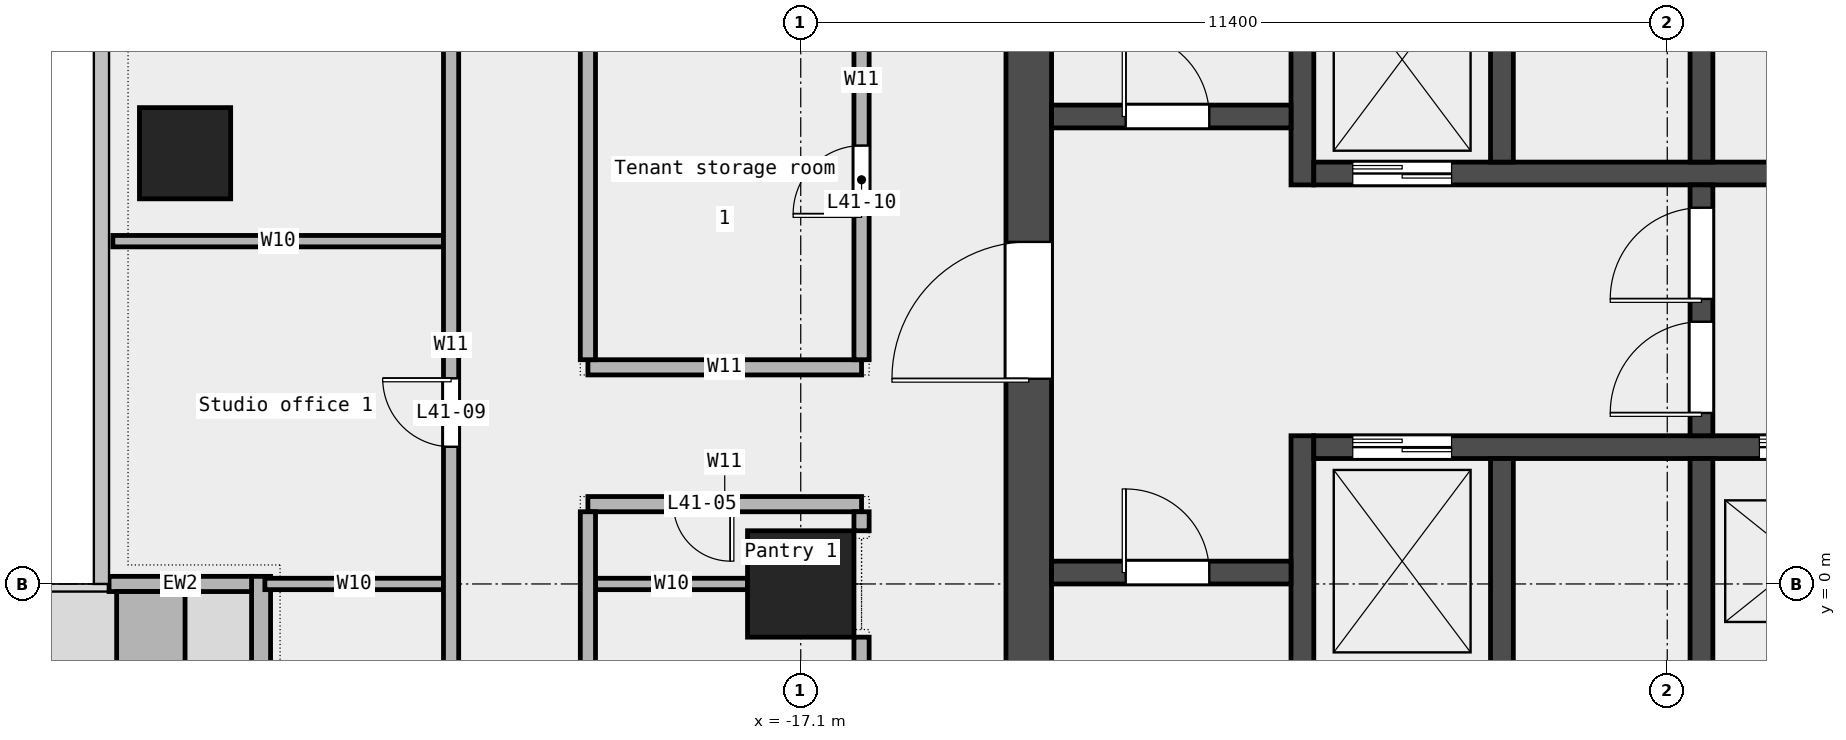
"""IFC4 building model, lengths in metres.
Left out: names, types, materials, properties, quantities, classifications, styles, units other than length and angle.
Written with IfcOpenShell. Run it as: python <this file> out.ifc"""

import sys

from ifc_helpers import new_model, si_unit, direction, frame, frame_2d, origin, origin_2d, place, context, subcontext, project, spatial, rectangle, extrude, element, fill, save


model = new_model("IFC4")
c1 = context("Model", 3, precision=1e-05, world=origin(), true_north=direction((0.0, 1.0)))
c2 = subcontext(c1, "Body", "Model", "MODEL_VIEW")
j1 = project(units=[si_unit("LENGTHUNIT", "METRE"), si_unit("PLANEANGLEUNIT", "RADIAN")], contexts=[c1])
p1 = place(None, origin())
s1 = spatial("IfcSite", under=j1, at=p1, CompositionType="ELEMENT")
p2 = place(p1, origin())
s2 = spatial("IfcBuilding", under=s1, at=p2, CompositionType="ELEMENT")
p3 = place(p2, frame((0.0, 0.0, 197.0)))
s3 = spatial("IfcBuildingStorey", under=s2, at=p3, CompositionType="ELEMENT", Elevation=197.0)
p4 = place(p3, frame((-25.2, 5.667, 0.0), z_axis=(0.0, 0.0, 1.0), x_axis=(1.0, 0.0, 0.0)))
e1 = element("IfcColumn", 1, at=p4, inside=s3, PredefinedType="COLUMN", context=c2, shape_type="SweptSolid", body=[
    extrude(rectangle(XDim=1.2, YDim=1.2, at=origin_2d()), origin(), (0.0, 0.0, 1.0), 3.6),
])
p5 = place(p3, frame((-17.1, 0.0, 0.0), z_axis=(0.0, 0.0, 1.0), x_axis=(1.0, 0.0, 0.0)))
e2 = element("IfcColumn", 2, at=p5, inside=s3, PredefinedType="COLUMN", context=c2, shape_type="SweptSolid", body=[
    extrude(rectangle(XDim=1.4, YDim=1.4, at=origin_2d()), origin(), (0.0, 0.0, 1.0), 3.6),
])
p6 = place(p3, frame((-24.2, 0.1, 0.0), z_axis=(0.0, 0.0, 1.0), x_axis=(0.0, -1.0, 0.0)))
e3 = element("IfcWall", 3, at=p6, inside=s3, PredefinedType="STANDARD", context=c2, shape_type="SweptSolid", body=[
    extrude(rectangle(XDim=12.95, YDim=0.25, at=frame_2d((6.475, 0.0))), origin(), (0.0, 0.0, 1.0), 3.6),
])
p7 = place(p6, frame((1.5, 0.0, 0.45)))
e4 = element("IfcOpeningElement", 4, at=p7, cuts=e3, PredefinedType="OPENING", context=c2, shape_type="SweptSolid", body=[
    extrude(rectangle(XDim=1.5, YDim=2.4, at=frame_2d((0.75, 1.2))), frame((0.0, 0.137, 0.0), z_axis=(0.0, -1.0, 0.0), x_axis=(1.0, 0.0, 0.0)), (0.0, 0.0, 1.0), 0.274),
])
p8 = place(p6, frame((6.75, 0.0, 0.0)))
e5 = element("IfcOpeningElement", 5, at=p8, cuts=e3, PredefinedType="OPENING", context=c2, shape_type="SweptSolid", body=[
    extrude(rectangle(XDim=1.8, YDim=2.4, at=frame_2d((0.9, 1.2))), frame((0.0, 0.137, 0.0), z_axis=(0.0, -1.0, 0.0), x_axis=(1.0, 0.0, 0.0)), (0.0, 0.0, 1.0), 0.274),
])
p9 = place(p6, frame((10.0, 0.0, 0.45)))
e6 = element("IfcOpeningElement", 6, at=p9, cuts=e3, PredefinedType="OPENING", context=c2, shape_type="SweptSolid", body=[
    extrude(rectangle(XDim=1.5, YDim=2.4, at=frame_2d((0.75, 1.2))), frame((0.0, 0.137, 0.0), z_axis=(0.0, -1.0, 0.0), x_axis=(1.0, 0.0, 0.0)), (0.0, 0.0, 1.0), 0.274),
])
p10 = place(p3, frame((-26.2, 0.0, 0.0), z_axis=(0.0, 0.0, 1.0), x_axis=(1.0, 0.0, 0.0)))
e7 = element("IfcWall", 7, at=p10, inside=s3, PredefinedType="STANDARD", context=c2, shape_type="SweptSolid", body=[
    extrude(rectangle(XDim=1.875, YDim=0.2, at=frame_2d((0.938, 0.0))), origin(), (0.0, 0.0, 1.0), 3.6),
])
p11 = place(p3, frame((-25.65, -0.1, 0.0), z_axis=(0.0, 0.0, 1.0), x_axis=(0.0, -1.0, 0.0)))
e8 = element("IfcWall", 8, at=p11, inside=s3, PredefinedType="STANDARD", context=c2, shape_type="SweptSolid", body=[
    extrude(rectangle(XDim=3.6, YDim=0.9, at=frame_2d((1.8, 0.0))), origin(), (0.0, 0.0, 1.0), 0.7),
])
p12 = place(p3, frame((-24.15, 0.0, 0.0), z_axis=(0.0, 0.0, 1.0), x_axis=(1.0, 0.0, 0.0)))
e9 = element("IfcWall", 9, at=p12, inside=s3, PredefinedType="PARTITIONING", context=c2, shape_type="SweptSolid", body=[
    extrude(rectangle(XDim=2.35, YDim=0.15, at=frame_2d((1.175, 0.0))), origin(), (0.0, 0.0, 1.0), 3.6),
])
p13 = place(p3, frame((-19.8, 0.0, 0.0), z_axis=(0.0, 0.0, 1.0), x_axis=(1.0, 0.0, 0.0)))
e10 = element("IfcWall", 10, at=p13, inside=s3, PredefinedType="PARTITIONING", context=c2, shape_type="SweptSolid", body=[
    extrude(rectangle(XDim=2.0, YDim=0.15, at=frame_2d((1.0, 0.0))), origin(), (0.0, 0.0, 1.0), 3.6),
])
p14 = place(p3, frame((-19.9, 1.05, 0.0), z_axis=(0.0, 0.0, 1.0), x_axis=(1.0, 0.0, 0.0)))
e11 = element("IfcWall", 11, at=p14, inside=s3, PredefinedType="PARTITIONING", context=c2, shape_type="SweptSolid", body=[
    extrude(rectangle(XDim=3.6, YDim=0.2, at=frame_2d((1.8, 0.0))), origin(), (0.0, 0.0, 1.0), 3.6),
])
p15 = place(p14, frame((1.125, 0.0, 0.0)))
e12 = element("IfcOpeningElement", 12, at=p15, cuts=e11, PredefinedType="OPENING", context=c2, shape_type="SweptSolid", body=[
    extrude(rectangle(XDim=0.75, YDim=2.1, at=frame_2d((0.375, 1.05))), frame((0.0, 0.112, 0.0), z_axis=(0.0, -1.0, 0.0), x_axis=(1.0, 0.0, 0.0)), (0.0, 0.0, 1.0), 0.224),
])
p16 = place(p3, frame((-19.9, 2.85, 0.0), z_axis=(0.0, 0.0, 1.0), x_axis=(1.0, 0.0, 0.0)))
e13 = element("IfcWall", 13, at=p16, inside=s3, PredefinedType="PARTITIONING", context=c2, shape_type="SweptSolid", body=[
    extrude(rectangle(XDim=3.6, YDim=0.2, at=frame_2d((1.8, 0.0))), origin(), (0.0, 0.0, 1.0), 3.6),
])
p17 = place(p3, frame((-26.15, 4.51, 0.0), z_axis=(0.0, 0.0, 1.0), x_axis=(1.0, 0.0, 0.0)))
e14 = element("IfcWall", 14, at=p17, inside=s3, PredefinedType="PARTITIONING", context=c2, shape_type="SweptSolid", body=[
    extrude(rectangle(XDim=4.35, YDim=0.15, at=frame_2d((2.175, 0.0))), origin(), (0.0, 0.0, 1.0), 3.6),
])
p18 = place(p3, frame((-21.7, -9.0, 0.0), z_axis=(0.0, 0.0, 1.0), x_axis=(0.0, 1.0, 0.0)))
e15 = element("IfcWall", 15, at=p18, inside=s3, PredefinedType="PARTITIONING", context=c2, shape_type="SweptSolid", body=[
    extrude(rectangle(XDim=24.3, YDim=0.2, at=frame_2d((12.15, 0.0))), origin(), (0.0, 0.0, 1.0), 3.6),
])
p19 = place(p18, frame((18.305, 0.0, 0.0)))
e16 = element("IfcOpeningElement", 16, at=p19, cuts=e15, PredefinedType="OPENING", context=c2, shape_type="SweptSolid", body=[
    extrude(rectangle(XDim=1.2, YDim=2.1, at=frame_2d((0.6, 1.05))), frame((0.0, 0.112, 0.0), z_axis=(0.0, -1.0, 0.0), x_axis=(1.0, 0.0, 0.0)), (0.0, 0.0, 1.0), 0.224),
])
p20 = place(p18, frame((10.805, 0.0, 0.0)))
e17 = element("IfcOpeningElement", 17, at=p20, cuts=e15, PredefinedType="OPENING", context=c2, shape_type="SweptSolid", body=[
    extrude(rectangle(XDim=0.9, YDim=2.1, at=frame_2d((0.45, 1.05))), frame((0.0, 0.112, 0.0), z_axis=(0.0, -1.0, 0.0), x_axis=(1.0, 0.0, 0.0)), (0.0, 0.0, 1.0), 0.224),
])
p21 = place(p3, frame((-19.9, -9.0, 0.0), z_axis=(0.0, 0.0, 1.0), x_axis=(0.0, 1.0, 0.0)))
e18 = element("IfcWall", 18, at=p21, inside=s3, PredefinedType="PARTITIONING", context=c2, shape_type="SweptSolid", body=[
    extrude(rectangle(XDim=9.95, YDim=0.2, at=frame_2d((4.975, 0.0))), origin(), (0.0, 0.0, 1.0), 3.6),
])
p22 = place(p3, frame((-19.9, 2.95, 0.0), z_axis=(0.0, 0.0, 1.0), x_axis=(0.0, 1.0, 0.0)))
e19 = element("IfcWall", 19, at=p22, inside=s3, PredefinedType="PARTITIONING", context=c2, shape_type="SweptSolid", body=[
    extrude(rectangle(XDim=12.35, YDim=0.2, at=frame_2d((6.175, 0.0))), origin(), (0.0, 0.0, 1.0), 3.6),
])
p23 = place(p3, frame((-16.3, -9.0, 0.0), z_axis=(0.0, 0.0, 1.0), x_axis=(0.0, 1.0, 0.0)))
e20 = element("IfcWall", 20, at=p23, inside=s3, PredefinedType="PARTITIONING", context=c2, shape_type="SweptSolid", body=[
    extrude(rectangle(XDim=8.3, YDim=0.2, at=frame_2d((4.15, 0.0))), origin(), (0.0, 0.0, 1.0), 3.6),
])
p24 = place(p3, frame((-16.3, 0.7, 0.0), z_axis=(0.0, 0.0, 1.0), x_axis=(0.0, 1.0, 0.0)))
e21 = element("IfcWall", 21, at=p24, inside=s3, PredefinedType="PARTITIONING", context=c2, shape_type="SweptSolid", body=[
    extrude(rectangle(XDim=0.25, YDim=0.2, at=frame_2d((0.125, 0.0))), origin(), (0.0, 0.0, 1.0), 3.6),
])
p25 = place(p3, frame((-16.3, 2.95, 0.0), z_axis=(0.0, 0.0, 1.0), x_axis=(0.0, 1.0, 0.0)))
e22 = element("IfcWall", 22, at=p25, inside=s3, PredefinedType="PARTITIONING", context=c2, shape_type="SweptSolid", body=[
    extrude(rectangle(XDim=7.35, YDim=0.2, at=frame_2d((3.675, 0.0))), origin(), (0.0, 0.0, 1.0), 3.6),
])
p26 = place(p25, frame((5.593, 0.0, 0.0)))
e23 = element("IfcOpeningElement", 23, at=p26, cuts=e22, PredefinedType="OPENING", context=c2, shape_type="SweptSolid", body=[
    extrude(rectangle(XDim=0.9, YDim=2.1, at=frame_2d((0.45, 1.05))), frame((0.0, 0.112, 0.0), z_axis=(0.0, -1.0, 0.0), x_axis=(1.0, 0.0, 0.0)), (0.0, 0.0, 1.0), 0.224),
])
p27 = place(p25, frame((1.917, 0.0, 0.0)))
e24 = element("IfcOpeningElement", 24, at=p27, cuts=e22, PredefinedType="OPENING", context=c2, shape_type="SweptSolid", body=[
    extrude(rectangle(XDim=0.9, YDim=2.1, at=frame_2d((0.45, 1.05))), frame((0.0, 0.112, 0.0), z_axis=(0.0, -1.0, 0.0), x_axis=(1.0, 0.0, 0.0)), (0.0, 0.0, 1.0), 0.224),
])
p28 = place(p3, frame((-14.1, -6.6, 0.0), z_axis=(0.0, 0.0, 1.0), x_axis=(0.0, 1.0, 0.0)))
e25 = element("IfcWall", 25, at=p28, inside=s3, PredefinedType="SHEAR", context=c2, shape_type="SweptSolid", body=[
    extrude(rectangle(XDim=19.5, YDim=0.6, at=frame_2d((9.75, 0.0))), origin(), (0.0, 0.0, 1.0), 3.7),
])
p29 = place(p28, frame((9.3, 0.0, 0.0)))
e26 = element("IfcOpeningElement", 26, at=p29, cuts=e25, PredefinedType="OPENING", context=c2, shape_type="SweptSolid", body=[
    extrude(rectangle(XDim=1.8, YDim=2.1, at=frame_2d((0.9, 1.05))), frame((0.0, 0.312, 0.0), z_axis=(0.0, -1.0, 0.0), x_axis=(1.0, 0.0, 0.0)), (0.0, 0.0, 1.0), 0.624),
])
p30 = place(p3, frame((-10.5, -6.6, 0.0), z_axis=(0.0, 0.0, 1.0), x_axis=(0.0, 1.0, 0.0)))
e27 = element("IfcWall", 27, at=p30, inside=s3, PredefinedType="SHEAR", context=c2, shape_type="SweptSolid", body=[
    extrude(rectangle(XDim=8.55, YDim=0.3, at=frame_2d((4.275, 0.0))), origin(), (0.0, 0.0, 1.0), 3.7),
])
p31 = place(p3, frame((-10.5, 5.25, 0.0), z_axis=(0.0, 0.0, 1.0), x_axis=(0.0, 1.0, 0.0)))
e28 = element("IfcWall", 28, at=p31, inside=s3, PredefinedType="SHEAR", context=c2, shape_type="SweptSolid", body=[
    extrude(rectangle(XDim=7.65, YDim=0.3, at=frame_2d((3.825, 0.0))), origin(), (0.0, 0.0, 1.0), 3.7),
])
p32 = place(p3, frame((-13.8, 0.15, 0.0), z_axis=(0.0, 0.0, 1.0), x_axis=(1.0, 0.0, 0.0)))
e29 = element("IfcWall", 29, at=p32, inside=s3, PredefinedType="SOLIDWALL", context=c2, shape_type="SweptSolid", body=[
    extrude(rectangle(XDim=3.15, YDim=0.3, at=frame_2d((1.575, 0.0))), origin(), (0.0, 0.0, 1.0), 3.7),
])
p33 = place(p32, frame((0.975, 0.0, 0.0)))
e30 = element("IfcOpeningElement", 30, at=p33, cuts=e29, PredefinedType="OPENING", context=c2, shape_type="SweptSolid", body=[
    extrude(rectangle(XDim=1.1, YDim=2.1, at=frame_2d((0.55, 1.05))), frame((0.0, 0.162, 0.0), z_axis=(0.0, -1.0, 0.0), x_axis=(1.0, 0.0, 0.0)), (0.0, 0.0, 1.0), 0.324),
])
p34 = place(p3, frame((-13.8, 6.15, 0.0), z_axis=(0.0, 0.0, 1.0), x_axis=(1.0, 0.0, 0.0)))
e31 = element("IfcWall", 31, at=p34, inside=s3, PredefinedType="SOLIDWALL", context=c2, shape_type="SweptSolid", body=[
    extrude(rectangle(XDim=3.15, YDim=0.3, at=frame_2d((1.575, 0.0))), origin(), (0.0, 0.0, 1.0), 3.7),
])
p35 = place(p34, frame((0.975, 0.0, 0.0)))
e32 = element("IfcOpeningElement", 32, at=p35, cuts=e31, PredefinedType="OPENING", context=c2, shape_type="SweptSolid", body=[
    extrude(rectangle(XDim=1.1, YDim=2.1, at=frame_2d((0.55, 1.05))), frame((0.0, 0.162, 0.0), z_axis=(0.0, -1.0, 0.0), x_axis=(1.0, 0.0, 0.0)), (0.0, 0.0, 1.0), 0.324),
])
p36 = place(p3, frame((-10.35, 1.8, 0.0), z_axis=(0.0, 0.0, 1.0), x_axis=(1.0, 0.0, 0.0)))
e33 = element("IfcWall", 33, at=p36, inside=s3, PredefinedType="SOLIDWALL", context=c2, shape_type="SweptSolid", body=[
    extrude(rectangle(XDim=20.7, YDim=0.3, at=frame_2d((10.35, 0.0))), origin(), (0.0, 0.0, 1.0), 3.7),
])
p37 = place(p36, frame((0.512, 0.0, 0.0)))
e34 = element("IfcOpeningElement", 34, at=p37, cuts=e33, PredefinedType="OPENING", context=c2, shape_type="SweptSolid", body=[
    extrude(rectangle(XDim=1.3, YDim=2.1, at=frame_2d((0.65, 1.05))), frame((0.0, 0.162, 0.0), z_axis=(0.0, -1.0, 0.0), x_axis=(1.0, 0.0, 0.0)), (0.0, 0.0, 1.0), 0.324),
])
p38 = place(p36, frame((5.863, 0.0, 0.0)))
e35 = element("IfcOpeningElement", 35, at=p38, cuts=e33, PredefinedType="OPENING", context=c2, shape_type="SweptSolid", body=[
    extrude(rectangle(XDim=1.1, YDim=2.1, at=frame_2d((0.55, 1.05))), frame((0.0, 0.162, 0.0), z_axis=(0.0, -1.0, 0.0), x_axis=(1.0, 0.0, 0.0)), (0.0, 0.0, 1.0), 0.324),
])
p39 = place(p36, frame((8.488, 0.0, 0.0)))
e36 = element("IfcOpeningElement", 36, at=p39, cuts=e33, PredefinedType="OPENING", context=c2, shape_type="SweptSolid", body=[
    extrude(rectangle(XDim=1.1, YDim=2.1, at=frame_2d((0.55, 1.05))), frame((0.0, 0.162, 0.0), z_axis=(0.0, -1.0, 0.0), x_axis=(1.0, 0.0, 0.0)), (0.0, 0.0, 1.0), 0.324),
])
p40 = place(p36, frame((11.113, 0.0, 0.0)))
e37 = element("IfcOpeningElement", 37, at=p40, cuts=e33, PredefinedType="OPENING", context=c2, shape_type="SweptSolid", body=[
    extrude(rectangle(XDim=1.1, YDim=2.1, at=frame_2d((0.55, 1.05))), frame((0.0, 0.162, 0.0), z_axis=(0.0, -1.0, 0.0), x_axis=(1.0, 0.0, 0.0)), (0.0, 0.0, 1.0), 0.324),
])
p41 = place(p36, frame((13.738, 0.0, 0.0)))
e38 = element("IfcOpeningElement", 38, at=p41, cuts=e33, PredefinedType="OPENING", context=c2, shape_type="SweptSolid", body=[
    extrude(rectangle(XDim=1.1, YDim=2.1, at=frame_2d((0.55, 1.05))), frame((0.0, 0.162, 0.0), z_axis=(0.0, -1.0, 0.0), x_axis=(1.0, 0.0, 0.0)), (0.0, 0.0, 1.0), 0.324),
])
p42 = place(p36, frame((16.363, 0.0, 0.0)))
e39 = element("IfcOpeningElement", 39, at=p42, cuts=e33, PredefinedType="OPENING", context=c2, shape_type="SweptSolid", body=[
    extrude(rectangle(XDim=1.1, YDim=2.1, at=frame_2d((0.55, 1.05))), frame((0.0, 0.162, 0.0), z_axis=(0.0, -1.0, 0.0), x_axis=(1.0, 0.0, 0.0)), (0.0, 0.0, 1.0), 0.324),
])
p43 = place(p36, frame((18.988, 0.0, 0.0)))
e40 = element("IfcOpeningElement", 40, at=p43, cuts=e33, PredefinedType="OPENING", context=c2, shape_type="SweptSolid", body=[
    extrude(rectangle(XDim=1.1, YDim=2.1, at=frame_2d((0.55, 1.05))), frame((0.0, 0.162, 0.0), z_axis=(0.0, -1.0, 0.0), x_axis=(1.0, 0.0, 0.0)), (0.0, 0.0, 1.0), 0.324),
])
p44 = place(p3, frame((-10.35, 5.4, 0.0), z_axis=(0.0, 0.0, 1.0), x_axis=(1.0, 0.0, 0.0)))
e41 = element("IfcWall", 41, at=p44, inside=s3, PredefinedType="SOLIDWALL", context=c2, shape_type="SweptSolid", body=[
    extrude(rectangle(XDim=20.7, YDim=0.3, at=frame_2d((10.35, 0.0))), origin(), (0.0, 0.0, 1.0), 3.7),
])
p45 = place(p44, frame((0.512, 0.0, 0.0)))
e42 = element("IfcOpeningElement", 42, at=p45, cuts=e41, PredefinedType="OPENING", context=c2, shape_type="SweptSolid", body=[
    extrude(rectangle(XDim=1.3, YDim=2.1, at=frame_2d((0.65, 1.05))), frame((0.0, 0.162, 0.0), z_axis=(0.0, -1.0, 0.0), x_axis=(1.0, 0.0, 0.0)), (0.0, 0.0, 1.0), 0.324),
])
for number, where, z_axis, x_axis in (
    (43, (-7.875, -1.05, 0.0), (0.0, 0.0, 1.0), (0.0, 1.0, 0.0)),
    (44, (-5.25, -1.05, 0.0), (0.0, 0.0, 1.0), (0.0, 1.0, 0.0)),
    (45, (-7.875, 5.55, 0.0), (0.0, 0.0, 1.0), (0.0, 1.0, 0.0)),
    (46, (-5.25, 5.55, 0.0), (0.0, 0.0, 1.0), (0.0, 1.0, 0.0)),
):
    element("IfcWall", number, at=place(p3, frame(where, z_axis=z_axis, x_axis=x_axis)), inside=s3, PredefinedType="SOLIDWALL", context=c2, shape_type="SweptSolid", body=[
        extrude(rectangle(XDim=2.7, YDim=0.3, at=frame_2d((1.35, 0.0))), origin(), (0.0, 0.0, 1.0), 3.7),
    ])
p46 = place(p3, frame((-5.25, 1.95, 0.0), z_axis=(0.0, 0.0, 1.0), x_axis=(0.0, 1.0, 0.0)))
e47 = element("IfcWall", 47, at=p46, inside=s3, PredefinedType="SOLIDWALL", context=c2, shape_type="SweptSolid", body=[
    extrude(rectangle(XDim=3.3, YDim=0.3, at=frame_2d((1.65, 0.0))), origin(), (0.0, 0.0, 1.0), 3.7),
])
p47 = place(p46, frame((0.3, 0.0, 0.0)))
e48 = element("IfcOpeningElement", 48, at=p47, cuts=e47, PredefinedType="OPENING", context=c2, shape_type="SweptSolid", body=[
    extrude(rectangle(XDim=1.2, YDim=2.1, at=frame_2d((0.6, 1.05))), frame((0.0, 0.162, 0.0), z_axis=(0.0, -1.0, 0.0), x_axis=(1.0, 0.0, 0.0)), (0.0, 0.0, 1.0), 0.324),
])
p48 = place(p46, frame((1.8, 0.0, 0.0)))
e49 = element("IfcOpeningElement", 49, at=p48, cuts=e47, PredefinedType="OPENING", context=c2, shape_type="SweptSolid", body=[
    extrude(rectangle(XDim=1.2, YDim=2.1, at=frame_2d((0.6, 1.05))), frame((0.0, 0.162, 0.0), z_axis=(0.0, -1.0, 0.0), x_axis=(1.0, 0.0, 0.0)), (0.0, 0.0, 1.0), 0.324),
])
p49 = place(p15, origin())
e50 = element("IfcDoor", 50, at=p49, inside=s3, OperationType="SINGLE_SWING_LEFT", PredefinedType="DOOR", context=c2, shape_type="SweptSolid", body=[
    extrude(rectangle(XDim=0.75, YDim=2.1, at=frame_2d((0.375, 1.05))), frame((0.0, 0.025, 0.0), z_axis=(0.0, -1.0, 0.0), x_axis=(1.0, 0.0, 0.0)), (0.0, 0.0, 1.0), 0.05),
])
fill(e12, e50)
p50 = place(p20, origin())
e51 = element("IfcDoor", 51, at=p50, inside=s3, OperationType="SINGLE_SWING_RIGHT", PredefinedType="DOOR", context=c2, shape_type="SweptSolid", body=[
    extrude(rectangle(XDim=0.9, YDim=2.1, at=frame_2d((0.45, 1.05))), frame((0.0, 0.025, 0.0), z_axis=(0.0, -1.0, 0.0), x_axis=(1.0, 0.0, 0.0)), (0.0, 0.0, 1.0), 0.05),
])
fill(e17, e51)
p51 = place(p27, origin())
e52 = element("IfcDoor", 52, at=p51, inside=s3, OperationType="SINGLE_SWING_LEFT", PredefinedType="DOOR", context=c2, shape_type="SweptSolid", body=[
    extrude(rectangle(XDim=0.9, YDim=2.1, at=frame_2d((0.45, 1.05))), frame((0.0, 0.025, 0.0), z_axis=(0.0, -1.0, 0.0), x_axis=(1.0, 0.0, 0.0)), (0.0, 0.0, 1.0), 0.05),
])
fill(e24, e52)
p52 = place(p33, origin())
e53 = element("IfcDoor", 53, at=p52, inside=s3, OperationType="SINGLE_SWING_LEFT", PredefinedType="DOOR", context=c2, shape_type="SweptSolid", body=[
    extrude(rectangle(XDim=1.1, YDim=2.1, at=frame_2d((0.55, 1.05))), frame((0.0, 0.025, 0.0), z_axis=(0.0, -1.0, 0.0), x_axis=(1.0, 0.0, 0.0)), (0.0, 0.0, 1.0), 0.05),
])
fill(e30, e53)
p53 = place(p35, origin())
e54 = element("IfcDoor", 54, at=p53, inside=s3, OperationType="SINGLE_SWING_LEFT", PredefinedType="DOOR", context=c2, shape_type="SweptSolid", body=[
    extrude(rectangle(XDim=1.1, YDim=2.1, at=frame_2d((0.55, 1.05))), frame((0.0, 0.025, 0.0), z_axis=(0.0, -1.0, 0.0), x_axis=(1.0, 0.0, 0.0)), (0.0, 0.0, 1.0), 0.05),
])
fill(e32, e54)
p54 = place(p29, origin())
e55 = element("IfcDoor", 55, at=p54, inside=s3, OperationType="DOUBLE_DOOR_SINGLE_SWING", PredefinedType="DOOR", context=c2, shape_type="SweptSolid", body=[
    extrude(rectangle(XDim=1.8, YDim=2.1, at=frame_2d((0.9, 1.05))), frame((0.0, 0.025, 0.0), z_axis=(0.0, -1.0, 0.0), x_axis=(1.0, 0.0, 0.0)), (0.0, 0.0, 1.0), 0.05),
])
fill(e26, e55)
p55 = place(p47, origin())
e56 = element("IfcDoor", 56, at=p55, inside=s3, OperationType="SINGLE_SWING_LEFT", PredefinedType="DOOR", context=c2, shape_type="SweptSolid", body=[
    extrude(rectangle(XDim=1.2, YDim=2.1, at=frame_2d((0.6, 1.05))), frame((0.0, 0.025, 0.0), z_axis=(0.0, -1.0, 0.0), x_axis=(1.0, 0.0, 0.0)), (0.0, 0.0, 1.0), 0.05),
])
fill(e48, e56)
p56 = place(p48, origin())
e57 = element("IfcDoor", 57, at=p56, inside=s3, OperationType="SINGLE_SWING_RIGHT", PredefinedType="DOOR", context=c2, shape_type="SweptSolid", body=[
    extrude(rectangle(XDim=1.2, YDim=2.1, at=frame_2d((0.6, 1.05))), frame((0.0, 0.025, 0.0), z_axis=(0.0, -1.0, 0.0), x_axis=(1.0, 0.0, 0.0)), (0.0, 0.0, 1.0), 0.05),
])
fill(e49, e57)
p57 = place(p37, origin())
e58 = element("IfcDoor", 58, at=p57, inside=s3, OperationType="DOUBLE_DOOR_SLIDING", PredefinedType="DOOR", context=c2, shape_type="SweptSolid", body=[
    extrude(rectangle(XDim=1.3, YDim=2.1, at=frame_2d((0.65, 1.05))), frame((0.0, 0.025, 0.0), z_axis=(0.0, -1.0, 0.0), x_axis=(1.0, 0.0, 0.0)), (0.0, 0.0, 1.0), 0.05),
])
fill(e34, e58)
p58 = place(p38, origin())
e59 = element("IfcDoor", 59, at=p58, inside=s3, OperationType="DOUBLE_DOOR_SLIDING", PredefinedType="DOOR", context=c2, shape_type="SweptSolid", body=[
    extrude(rectangle(XDim=1.1, YDim=2.1, at=frame_2d((0.55, 1.05))), frame((0.0, 0.025, 0.0), z_axis=(0.0, -1.0, 0.0), x_axis=(1.0, 0.0, 0.0)), (0.0, 0.0, 1.0), 0.05),
])
fill(e35, e59)
p59 = place(p45, origin())
e60 = element("IfcDoor", 60, at=p59, inside=s3, OperationType="DOUBLE_DOOR_SLIDING", PredefinedType="DOOR", context=c2, shape_type="SweptSolid", body=[
    extrude(rectangle(XDim=1.3, YDim=2.1, at=frame_2d((0.65, 1.05))), frame((0.0, 0.025, 0.0), z_axis=(0.0, -1.0, 0.0), x_axis=(1.0, 0.0, 0.0)), (0.0, 0.0, 1.0), 0.05),
])
fill(e42, e60)
save(model, sys.argv[1])
